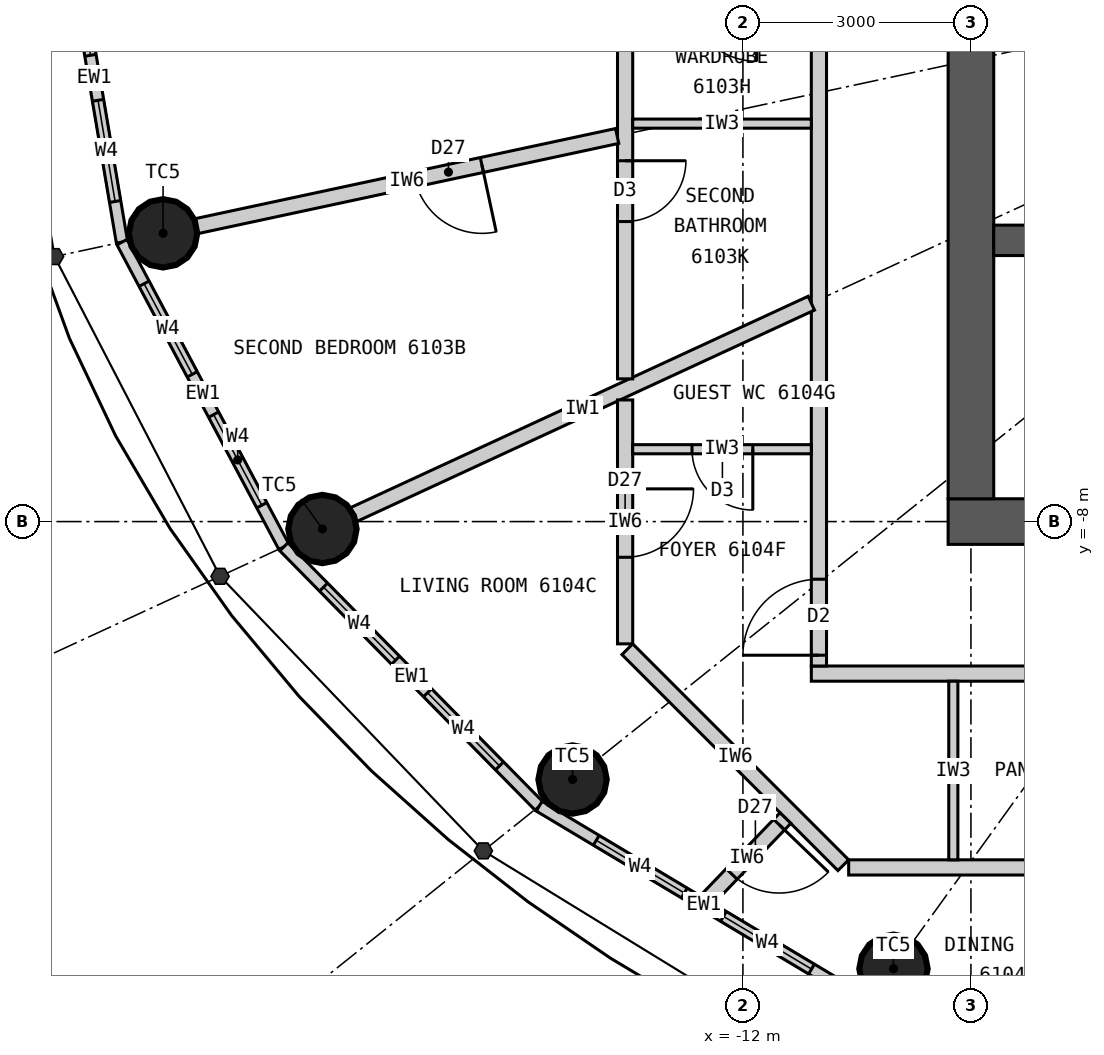
"""IFC4 building model, lengths in metres.
Left out: names, types, materials, properties, quantities, classifications, styles, units other than length and angle.
Written with IfcOpenShell. Run it as: python <this file> out.ifc"""

import sys

from ifc_helpers import new_model, si_unit, direction, frame, frame_2d, origin, origin_2d, place, context, subcontext, project, spatial, rectangle, circle, extrude, element, fill, save


model = new_model("IFC4")
c1 = context("Model", 3, precision=1e-05, world=origin(), true_north=direction((0.0, 1.0)))
c2 = subcontext(c1, "Body", "Model", "MODEL_VIEW")
j1 = project(units=[si_unit("LENGTHUNIT", "METRE"), si_unit("PLANEANGLEUNIT", "RADIAN")], contexts=[c1])
p1 = place(None, origin())
s1 = spatial("IfcSite", under=j1, at=p1, CompositionType="ELEMENT")
p2 = place(p1, origin())
s2 = spatial("IfcBuilding", under=s1, at=p2, CompositionType="ELEMENT")
p3 = place(p2, frame((0.0, 0.0, 225.9)))
s3 = spatial("IfcBuildingStorey", under=s2, at=p3, CompositionType="ELEMENT", Elevation=225.9)
for number, where, z_axis, x_axis in (
    (1, (-19.629, -4.208, 0.0), (0.0, 0.0, 1.0), (1.0, 0.0, 0.0)),
    (2, (-17.532, -8.098, 0.0), (0.0, 0.0, 1.0), (1.0, 0.0, 0.0)),
    (3, (-14.241, -11.393, 0.0), (0.0, 0.0, 1.0), (1.0, 0.0, 0.0)),
    (4, (-10.019, -13.883, 0.0), (0.0, 0.0, 1.0), (1.0, 0.0, 0.0)),
):
    element("IfcColumn", number, at=place(p3, frame(where, z_axis=z_axis, x_axis=x_axis)), inside=s3, PredefinedType="COLUMN", context=c2, shape_type="SweptSolid", body=[
        extrude(circle(Radius=0.45, at=origin_2d()), origin(), (0.0, 0.0, 1.0), 3.3),
    ])
p4 = place(p3, frame((9.3, -8.0, 0.0), z_axis=(0.0, 0.0, 1.0), x_axis=(-1.0, 0.0, 0.0)))
e5 = element("IfcWall", 5, at=p4, inside=s3, PredefinedType="SHEAR", context=c2, shape_type="SweptSolid", body=[
    extrude(rectangle(XDim=18.6, YDim=0.6, at=frame_2d((9.3, 0.0))), origin(), (0.0, 0.0, 1.0), 3.3),
])
p5 = place(p4, frame((8.0, 0.0, 0.0)))
e6 = element("IfcOpeningElement", 6, at=p5, cuts=e5, PredefinedType="OPENING", context=c2, shape_type="SweptSolid", body=[
    extrude(rectangle(XDim=1.2, YDim=2.2, at=frame_2d((0.6, 1.1))), frame((0.0, 0.31, 0.0), z_axis=(0.0, -1.0, 0.0), x_axis=(1.0, 0.0, 0.0)), (0.0, 0.0, 1.0), 0.62),
])
p6 = place(p4, frame((15.6, 0.0, 0.0)))
e7 = element("IfcOpeningElement", 7, at=p6, cuts=e5, PredefinedType="OPENING", context=c2, shape_type="SweptSolid", body=[
    extrude(rectangle(XDim=0.9, YDim=2.2, at=frame_2d((0.45, 1.1))), frame((0.0, 0.31, 0.0), z_axis=(0.0, -1.0, 0.0), x_axis=(1.0, 0.0, 0.0)), (0.0, 0.0, 1.0), 0.62),
])
p7 = place(p3, frame((-9.0, 7.7, 0.0), z_axis=(0.0, 0.0, 1.0), x_axis=(0.0, -1.0, 0.0)))
e8 = element("IfcWall", 8, at=p7, inside=s3, PredefinedType="SHEAR", context=c2, shape_type="SweptSolid", body=[
    extrude(rectangle(XDim=15.4, YDim=0.6, at=frame_2d((7.7, 0.0))), origin(), (0.0, 0.0, 1.0), 3.3),
])
p8 = place(p7, frame((6.8, 0.0, 0.0)))
e9 = element("IfcOpeningElement", 9, at=p8, cuts=e8, PredefinedType="OPENING", context=c2, shape_type="SweptSolid", body=[
    extrude(rectangle(XDim=1.8, YDim=2.2, at=frame_2d((0.9, 1.1))), frame((0.0, 0.31, 0.0), z_axis=(0.0, -1.0, 0.0), x_axis=(1.0, 0.0, 0.0)), (0.0, 0.0, 1.0), 0.62),
])
p9 = place(p3, frame((-8.7, -4.3, 0.0), z_axis=(0.0, 0.0, 1.0), x_axis=(1.0, 0.0, 0.0)))
e10 = element("IfcWall", 10, at=p9, inside=s3, PredefinedType="SHEAR", context=c2, shape_type="SweptSolid", body=[
    extrude(rectangle(XDim=17.4, YDim=0.4, at=frame_2d((8.7, 0.0))), origin(), (0.0, 0.0, 1.0), 3.3),
])
p10 = place(p3, frame((-20.9, 0.0, 0.0), z_axis=(0.0, 0.0, 1.0), x_axis=(0.166538513568, -0.986034950445, 0.0)))
e11 = element("IfcWall", 11, at=p10, inside=s3, PredefinedType="ELEMENTEDWALL", context=c2, shape_type="SweptSolid", body=[
    extrude(rectangle(XDim=4.385, YDim=0.15, at=frame_2d((2.192, 0.0))), origin(), (0.0, 0.0, 1.0), 3.12),
])
p11 = place(p10, frame((0.542, 0.0, 0.9)))
e12 = element("IfcOpeningElement", 12, at=p11, cuts=e11, PredefinedType="OPENING", context=c2, shape_type="SweptSolid", body=[
    extrude(rectangle(XDim=1.35, YDim=1.9, at=frame_2d((0.675, 0.95))), frame((0.0, 0.085, 0.0), z_axis=(0.0, -1.0, 0.0), x_axis=(1.0, 0.0, 0.0)), (0.0, 0.0, 1.0), 0.17),
])
p12 = place(p10, frame((2.492, 0.0, 0.9)))
e13 = element("IfcOpeningElement", 13, at=p12, cuts=e11, PredefinedType="OPENING", context=c2, shape_type="SweptSolid", body=[
    extrude(rectangle(XDim=1.35, YDim=1.9, at=frame_2d((0.675, 0.95))), frame((0.0, 0.085, 0.0), z_axis=(0.0, -1.0, 0.0), x_axis=(1.0, 0.0, 0.0)), (0.0, 0.0, 1.0), 0.17),
])
p13 = place(p3, frame((-20.17, -4.323, 0.0), z_axis=(0.0, 0.0, 1.0), x_axis=(0.469256152955, -0.883062094597, 0.0)))
e14 = element("IfcWall", 14, at=p13, inside=s3, PredefinedType="ELEMENTEDWALL", context=c2, shape_type="SweptSolid", body=[
    extrude(rectangle(XDim=4.539, YDim=0.15, at=frame_2d((2.27, 0.0))), origin(), (0.0, 0.0, 1.0), 3.12),
])
p14 = place(p13, frame((0.62, 0.0, 0.9)))
e15 = element("IfcOpeningElement", 15, at=p14, cuts=e14, PredefinedType="OPENING", context=c2, shape_type="SweptSolid", body=[
    extrude(rectangle(XDim=1.35, YDim=1.9, at=frame_2d((0.675, 0.95))), frame((0.0, 0.085, 0.0), z_axis=(0.0, -1.0, 0.0), x_axis=(1.0, 0.0, 0.0)), (0.0, 0.0, 1.0), 0.17),
])
p15 = place(p13, frame((2.57, 0.0, 0.9)))
e16 = element("IfcOpeningElement", 16, at=p15, cuts=e14, PredefinedType="OPENING", context=c2, shape_type="SweptSolid", body=[
    extrude(rectangle(XDim=1.35, YDim=1.9, at=frame_2d((0.675, 0.95))), frame((0.0, 0.085, 0.0), z_axis=(0.0, -1.0, 0.0), x_axis=(1.0, 0.0, 0.0)), (0.0, 0.0, 1.0), 0.17),
])
p16 = place(p3, frame((-18.04, -8.332, 0.0), z_axis=(0.0, 0.0, 1.0), x_axis=(0.701527379618, -0.712642501993, 0.0)))
e17 = element("IfcWall", 17, at=p16, inside=s3, PredefinedType="ELEMENTEDWALL", context=c2, shape_type="SweptSolid", body=[
    extrude(rectangle(XDim=4.788, YDim=0.15, at=frame_2d((2.394, 0.0))), origin(), (0.0, 0.0, 1.0), 3.12),
])
p17 = place(p16, frame((0.744, 0.0, 0.9)))
e18 = element("IfcOpeningElement", 18, at=p17, cuts=e17, PredefinedType="OPENING", context=c2, shape_type="SweptSolid", body=[
    extrude(rectangle(XDim=1.35, YDim=1.9, at=frame_2d((0.675, 0.95))), frame((0.0, 0.085, 0.0), z_axis=(0.0, -1.0, 0.0), x_axis=(1.0, 0.0, 0.0)), (0.0, 0.0, 1.0), 0.17),
])
p18 = place(p16, frame((2.694, 0.0, 0.9)))
e19 = element("IfcOpeningElement", 19, at=p18, cuts=e17, PredefinedType="OPENING", context=c2, shape_type="SweptSolid", body=[
    extrude(rectangle(XDim=1.35, YDim=1.9, at=frame_2d((0.675, 0.95))), frame((0.0, 0.085, 0.0), z_axis=(0.0, -1.0, 0.0), x_axis=(1.0, 0.0, 0.0)), (0.0, 0.0, 1.0), 0.17),
])
p19 = place(p3, frame((-14.68, -11.744, 0.0), z_axis=(0.0, 0.0, 1.0), x_axis=(0.85822150553, -0.513279502265, 0.0)))
e20 = element("IfcWall", 20, at=p19, inside=s3, PredefinedType="ELEMENTEDWALL", context=c2, shape_type="SweptSolid", body=[
    extrude(rectangle(XDim=5.05, YDim=0.15, at=frame_2d((2.525, 0.0))), origin(), (0.0, 0.0, 1.0), 3.12),
])
p20 = place(p19, frame((0.875, 0.0, 0.9)))
e21 = element("IfcOpeningElement", 21, at=p20, cuts=e20, PredefinedType="OPENING", context=c2, shape_type="SweptSolid", body=[
    extrude(rectangle(XDim=1.35, YDim=1.9, at=frame_2d((0.675, 0.95))), frame((0.0, 0.085, 0.0), z_axis=(0.0, -1.0, 0.0), x_axis=(1.0, 0.0, 0.0)), (0.0, 0.0, 1.0), 0.17),
])
p21 = place(p19, frame((2.825, 0.0, 0.9)))
e22 = element("IfcOpeningElement", 22, at=p21, cuts=e20, PredefinedType="OPENING", context=c2, shape_type="SweptSolid", body=[
    extrude(rectangle(XDim=1.35, YDim=1.9, at=frame_2d((0.675, 0.95))), frame((0.0, 0.085, 0.0), z_axis=(0.0, -1.0, 0.0), x_axis=(1.0, 0.0, 0.0)), (0.0, 0.0, 1.0), 0.17),
])
p22 = place(p3, frame((11.1, -10.0, 0.0), z_axis=(0.0, 0.0, 1.0), x_axis=(-1.0, 0.0, 0.0)))
e23 = element("IfcWall", 23, at=p22, inside=s3, PredefinedType="PARTITIONING", context=c2, shape_type="SweptSolid", body=[
    extrude(rectangle(XDim=22.2, YDim=0.2, at=frame_2d((11.1, 0.0))), origin(), (0.0, 0.0, 1.0), 3.12),
])
p23 = place(p22, frame((0.3, 0.0, 0.0)))
e24 = element("IfcOpeningElement", 24, at=p23, cuts=e23, PredefinedType="OPENING", context=c2, shape_type="SweptSolid", body=[
    extrude(rectangle(XDim=1.0, YDim=2.2, at=frame_2d((0.5, 1.1))), frame((0.0, 0.11, 0.0), z_axis=(0.0, -1.0, 0.0), x_axis=(1.0, 0.0, 0.0)), (0.0, 0.0, 1.0), 0.22),
])
p24 = place(p3, frame((-11.0, 9.9, 0.0), z_axis=(0.0, 0.0, 1.0), x_axis=(0.0, -1.0, 0.0)))
e25 = element("IfcWall", 25, at=p24, inside=s3, PredefinedType="PARTITIONING", context=c2, shape_type="SweptSolid", body=[
    extrude(rectangle(XDim=19.8, YDim=0.2, at=frame_2d((9.9, 0.0))), origin(), (0.0, 0.0, 1.0), 3.12),
])
p25 = place(p24, frame((9.385, 0.0, 0.0)))
e26 = element("IfcOpeningElement", 26, at=p25, cuts=e25, PredefinedType="OPENING", context=c2, shape_type="SweptSolid", body=[
    extrude(rectangle(XDim=1.0, YDim=2.2, at=frame_2d((0.5, 1.1))), frame((0.0, 0.11, 0.0), z_axis=(0.0, -1.0, 0.0), x_axis=(1.0, 0.0, 0.0)), (0.0, 0.0, 1.0), 0.22),
])
p26 = place(p24, frame((18.658, 0.0, 0.0)))
e27 = element("IfcOpeningElement", 27, at=p26, cuts=e25, PredefinedType="OPENING", context=c2, shape_type="SweptSolid", body=[
    extrude(rectangle(XDim=1.0, YDim=2.2, at=frame_2d((0.5, 1.1))), frame((0.0, 0.11, 0.0), z_axis=(0.0, -1.0, 0.0), x_axis=(1.0, 0.0, 0.0)), (0.0, 0.0, 1.0), 0.22),
])
p27 = place(p3, frame((-11.1, -5.127, 0.0), z_axis=(0.0, 0.0, 1.0), x_axis=(-0.907840886552, -0.419314827672, 0.0)))
e28 = element("IfcWall", 28, at=p27, inside=s3, PredefinedType="PARTITIONING", context=c2, shape_type="SweptSolid", body=[
    extrude(rectangle(XDim=6.635, YDim=0.2, at=frame_2d((3.318, 0.0))), origin(), (0.0, 0.0, 1.0), 2.32),
])
p28 = place(p3, frame((-13.55, 6.117, 0.0), z_axis=(0.0, 0.0, 1.0), x_axis=(0.0, -1.0, 0.0)))
e29 = element("IfcWall", 29, at=p28, inside=s3, PredefinedType="PARTITIONING", context=c2, shape_type="SweptSolid", body=[
    extrude(rectangle(XDim=12.24, YDim=0.2, at=frame_2d((6.12, 0.0))), origin(), (0.0, 0.0, 1.0), 3.12),
])
p29 = place(p28, frame((2.07, 0.0, 0.0)))
e30 = element("IfcOpeningElement", 30, at=p29, cuts=e29, PredefinedType="OPENING", context=c2, shape_type="SweptSolid", body=[
    extrude(rectangle(XDim=0.8, YDim=2.1, at=frame_2d((0.4, 1.05))), frame((0.0, 0.11, 0.0), z_axis=(0.0, -1.0, 0.0), x_axis=(1.0, 0.0, 0.0)), (0.0, 0.0, 1.0), 0.22),
])
p30 = place(p28, frame((9.37, 0.0, 0.0)))
e31 = element("IfcOpeningElement", 31, at=p30, cuts=e29, PredefinedType="OPENING", context=c2, shape_type="SweptSolid", body=[
    extrude(rectangle(XDim=0.8, YDim=2.1, at=frame_2d((0.4, 1.05))), frame((0.0, 0.11, 0.0), z_axis=(0.0, -1.0, 0.0), x_axis=(1.0, 0.0, 0.0)), (0.0, 0.0, 1.0), 0.22),
])
p31 = place(p28, frame((5.67, 0.0, 0.0)))
e32 = element("IfcOpeningElement", 32, at=p31, cuts=e29, PredefinedType="OPENING", context=c2, shape_type="SweptSolid", body=[
    extrude(rectangle(XDim=0.9, YDim=2.1, at=frame_2d((0.45, 1.05))), frame((0.0, 0.11, 0.0), z_axis=(0.0, -1.0, 0.0), x_axis=(1.0, 0.0, 0.0)), (0.0, 0.0, 1.0), 0.22),
])
p32 = place(p3, frame((-13.655, -2.927, 0.0), z_axis=(0.0, 0.0, 1.0), x_axis=(-0.977790419294, -0.209585056568, 0.0)))
e33 = element("IfcWall", 33, at=p32, inside=s3, PredefinedType="PARTITIONING", context=c2, shape_type="SweptSolid", body=[
    extrude(rectangle(XDim=5.66, YDim=0.2, at=frame_2d((2.83, 0.0))), origin(), (0.0, 0.0, 1.0), 2.42),
])
p33 = place(p32, frame((1.82, 0.0, 0.0)))
e34 = element("IfcOpeningElement", 34, at=p33, cuts=e33, PredefinedType="OPENING", context=c2, shape_type="SweptSolid", body=[
    extrude(rectangle(XDim=0.9, YDim=2.1, at=frame_2d((0.45, 1.05))), frame((0.0, 0.11, 0.0), z_axis=(0.0, -1.0, 0.0), x_axis=(1.0, 0.0, 0.0)), (0.0, 0.0, 1.0), 0.22),
])
p34 = place(p3, frame((-11.1, -2.764, 0.0), z_axis=(0.0, 0.0, 1.0), x_axis=(-1.0, 0.0, 0.0)))
e35 = element("IfcWall", 35, at=p34, inside=s3, PredefinedType="PARTITIONING", context=c2, shape_type="SweptSolid", body=[
    extrude(rectangle(XDim=2.35, YDim=0.12, at=frame_2d((1.175, 0.0))), origin(), (0.0, 0.0, 1.0), 2.42),
])
p35 = place(p3, frame((-13.55, -6.4, 0.0), z_axis=(0.0, 0.0, 1.0), x_axis=(0.0, -1.0, 0.0)))
e36 = element("IfcWall", 36, at=p35, inside=s3, PredefinedType="PARTITIONING", context=c2, shape_type="SweptSolid", body=[
    extrude(rectangle(XDim=3.209, YDim=0.2, at=frame_2d((1.604, 0.0))), origin(), (0.0, 0.0, 1.0), 3.12),
])
p36 = place(p35, frame((1.17, 0.0, 0.0)))
e37 = element("IfcOpeningElement", 37, at=p36, cuts=e36, PredefinedType="OPENING", context=c2, shape_type="SweptSolid", body=[
    extrude(rectangle(XDim=0.9, YDim=2.1, at=frame_2d((0.45, 1.05))), frame((0.0, 0.11, 0.0), z_axis=(0.0, -1.0, 0.0), x_axis=(1.0, 0.0, 0.0)), (0.0, 0.0, 1.0), 0.22),
])
p37 = place(p3, frame((-13.521, -9.679, 0.0), z_axis=(0.0, 0.0, 1.0), x_axis=(0.707106781187, -0.707106781187, 0.0)))
e38 = element("IfcWall", 38, at=p37, inside=s3, PredefinedType="PARTITIONING", context=c2, shape_type="SweptSolid", body=[
    extrude(rectangle(XDim=4.019, YDim=0.2, at=frame_2d((2.009, 0.0))), origin(), (0.0, 0.0, 1.0), 3.12),
])
p38 = place(p3, frame((-10.609, -12.55, 0.0), z_axis=(0.0, 0.0, 1.0), x_axis=(1.0, 0.0, 0.0)))
e39 = element("IfcWall", 39, at=p38, inside=s3, PredefinedType="PARTITIONING", context=c2, shape_type="SweptSolid", body=[
    extrude(rectangle(XDim=10.508, YDim=0.2, at=frame_2d((5.254, 0.0))), origin(), (0.0, 0.0, 1.0), 3.12),
])
p39 = place(p38, frame((2.57, 0.0, 0.0)))
e40 = element("IfcOpeningElement", 40, at=p39, cuts=e39, PredefinedType="OPENING", context=c2, shape_type="SweptSolid", body=[
    extrude(rectangle(XDim=0.9, YDim=2.1, at=frame_2d((0.45, 1.05))), frame((0.0, 0.11, 0.0), z_axis=(0.0, -1.0, 0.0), x_axis=(1.0, 0.0, 0.0)), (0.0, 0.0, 1.0), 0.22),
])
p40 = place(p38, frame((4.82, 0.0, 0.0)))
e41 = element("IfcOpeningElement", 41, at=p40, cuts=e39, PredefinedType="OPENING", context=c2, shape_type="SweptSolid", body=[
    extrude(rectangle(XDim=0.9, YDim=2.1, at=frame_2d((0.45, 1.05))), frame((0.0, 0.11, 0.0), z_axis=(0.0, -1.0, 0.0), x_axis=(1.0, 0.0, 0.0)), (0.0, 0.0, 1.0), 0.22),
])
p41 = place(p38, frame((7.303, 0.0, 0.0)))
e42 = element("IfcOpeningElement", 42, at=p41, cuts=e39, PredefinedType="OPENING", context=c2, shape_type="SweptSolid", body=[
    extrude(rectangle(XDim=0.8, YDim=2.1, at=frame_2d((0.4, 1.05))), frame((0.0, 0.11, 0.0), z_axis=(0.0, -1.0, 0.0), x_axis=(1.0, 0.0, 0.0)), (0.0, 0.0, 1.0), 0.22),
])
p42 = place(p3, frame((-11.441, -11.9, 0.0), z_axis=(0.0, 0.0, 1.0), x_axis=(-0.692958717259, -0.720977264672, 0.0)))
e43 = element("IfcWall", 43, at=p42, inside=s3, PredefinedType="PARTITIONING", context=c2, shape_type="SweptSolid", body=[
    extrude(rectangle(XDim=1.464, YDim=0.2, at=frame_2d((0.732, 0.0))), origin(), (0.0, 0.0, 1.0), 3.12),
])
p43 = place(p42, frame((0.12, 0.0, 0.0)))
e44 = element("IfcOpeningElement", 44, at=p43, cuts=e43, PredefinedType="OPENING", context=c2, shape_type="SweptSolid", body=[
    extrude(rectangle(XDim=0.9, YDim=2.1, at=frame_2d((0.45, 1.05))), frame((0.0, 0.11, 0.0), z_axis=(0.0, -1.0, 0.0), x_axis=(1.0, 0.0, 0.0)), (0.0, 0.0, 1.0), 0.22),
])
p44 = place(p3, frame((-11.1, -7.048, 0.0), z_axis=(0.0, 0.0, 1.0), x_axis=(-1.0, 0.0, 0.0)))
e45 = element("IfcWall", 45, at=p44, inside=s3, PredefinedType="PARTITIONING", context=c2, shape_type="SweptSolid", body=[
    extrude(rectangle(XDim=2.35, YDim=0.12, at=frame_2d((1.175, 0.0))), origin(), (0.0, 0.0, 1.0), 3.12),
])
p45 = place(p44, frame((0.77, 0.0, 0.0)))
e46 = element("IfcOpeningElement", 46, at=p45, cuts=e45, PredefinedType="OPENING", context=c2, shape_type="SweptSolid", body=[
    extrude(rectangle(XDim=0.8, YDim=2.1, at=frame_2d((0.4, 1.05))), frame((0.0, 0.07, 0.0), z_axis=(0.0, -1.0, 0.0), x_axis=(1.0, 0.0, 0.0)), (0.0, 0.0, 1.0), 0.14),
])
p46 = place(p3, frame((-9.232, -10.1, 0.0), z_axis=(0.0, 0.0, 1.0), x_axis=(0.0, -1.0, 0.0)))
e47 = element("IfcWall", 47, at=p46, inside=s3, PredefinedType="PARTITIONING", context=c2, shape_type="SweptSolid", body=[
    extrude(rectangle(XDim=2.35, YDim=0.12, at=frame_2d((1.175, 0.0))), origin(), (0.0, 0.0, 1.0), 3.12),
])
p47 = place(p11, origin())
e48 = element("IfcWindow", 48, at=p47, inside=s3, PartitioningType="SINGLE_PANEL", PredefinedType="WINDOW", context=c2, shape_type="SweptSolid", body=[
    extrude(rectangle(XDim=1.35, YDim=1.9, at=frame_2d((0.675, 0.95))), frame((0.0, 0.03, 0.0), z_axis=(0.0, -1.0, 0.0), x_axis=(1.0, 0.0, 0.0)), (0.0, 0.0, 1.0), 0.06),
])
fill(e12, e48)
p48 = place(p12, origin())
e49 = element("IfcWindow", 49, at=p48, inside=s3, PartitioningType="SINGLE_PANEL", PredefinedType="WINDOW", context=c2, shape_type="SweptSolid", body=[
    extrude(rectangle(XDim=1.35, YDim=1.9, at=frame_2d((0.675, 0.95))), frame((0.0, 0.03, 0.0), z_axis=(0.0, -1.0, 0.0), x_axis=(1.0, 0.0, 0.0)), (0.0, 0.0, 1.0), 0.06),
])
fill(e13, e49)
p49 = place(p14, origin())
e50 = element("IfcWindow", 50, at=p49, inside=s3, PartitioningType="SINGLE_PANEL", PredefinedType="WINDOW", context=c2, shape_type="SweptSolid", body=[
    extrude(rectangle(XDim=1.35, YDim=1.9, at=frame_2d((0.675, 0.95))), frame((0.0, 0.03, 0.0), z_axis=(0.0, -1.0, 0.0), x_axis=(1.0, 0.0, 0.0)), (0.0, 0.0, 1.0), 0.06),
])
fill(e15, e50)
p50 = place(p15, origin())
e51 = element("IfcWindow", 51, at=p50, inside=s3, PartitioningType="SINGLE_PANEL", PredefinedType="WINDOW", context=c2, shape_type="SweptSolid", body=[
    extrude(rectangle(XDim=1.35, YDim=1.9, at=frame_2d((0.675, 0.95))), frame((0.0, 0.03, 0.0), z_axis=(0.0, -1.0, 0.0), x_axis=(1.0, 0.0, 0.0)), (0.0, 0.0, 1.0), 0.06),
])
fill(e16, e51)
p51 = place(p17, origin())
e52 = element("IfcWindow", 52, at=p51, inside=s3, PartitioningType="SINGLE_PANEL", PredefinedType="WINDOW", context=c2, shape_type="SweptSolid", body=[
    extrude(rectangle(XDim=1.35, YDim=1.9, at=frame_2d((0.675, 0.95))), frame((0.0, 0.03, 0.0), z_axis=(0.0, -1.0, 0.0), x_axis=(1.0, 0.0, 0.0)), (0.0, 0.0, 1.0), 0.06),
])
fill(e18, e52)
p52 = place(p18, origin())
e53 = element("IfcWindow", 53, at=p52, inside=s3, PartitioningType="SINGLE_PANEL", PredefinedType="WINDOW", context=c2, shape_type="SweptSolid", body=[
    extrude(rectangle(XDim=1.35, YDim=1.9, at=frame_2d((0.675, 0.95))), frame((0.0, 0.03, 0.0), z_axis=(0.0, -1.0, 0.0), x_axis=(1.0, 0.0, 0.0)), (0.0, 0.0, 1.0), 0.06),
])
fill(e19, e53)
p53 = place(p20, origin())
e54 = element("IfcWindow", 54, at=p53, inside=s3, PartitioningType="SINGLE_PANEL", PredefinedType="WINDOW", context=c2, shape_type="SweptSolid", body=[
    extrude(rectangle(XDim=1.35, YDim=1.9, at=frame_2d((0.675, 0.95))), frame((0.0, 0.03, 0.0), z_axis=(0.0, -1.0, 0.0), x_axis=(1.0, 0.0, 0.0)), (0.0, 0.0, 1.0), 0.06),
])
fill(e21, e54)
p54 = place(p21, origin())
e55 = element("IfcWindow", 55, at=p54, inside=s3, PartitioningType="SINGLE_PANEL", PredefinedType="WINDOW", context=c2, shape_type="SweptSolid", body=[
    extrude(rectangle(XDim=1.35, YDim=1.9, at=frame_2d((0.675, 0.95))), frame((0.0, 0.03, 0.0), z_axis=(0.0, -1.0, 0.0), x_axis=(1.0, 0.0, 0.0)), (0.0, 0.0, 1.0), 0.06),
])
fill(e22, e55)
p55 = place(p30, origin())
e56 = element("IfcDoor", 56, at=p55, inside=s3, OperationType="SINGLE_SWING_LEFT", PredefinedType="DOOR", context=c2, shape_type="SweptSolid", body=[
    extrude(rectangle(XDim=0.8, YDim=2.1, at=frame_2d((0.4, 1.05))), frame((0.0, 0.025, 0.0), z_axis=(0.0, -1.0, 0.0), x_axis=(1.0, 0.0, 0.0)), (0.0, 0.0, 1.0), 0.05),
])
fill(e31, e56)
p56 = place(p33, origin())
e57 = element("IfcDoor", 57, at=p56, inside=s3, OperationType="SINGLE_SWING_LEFT", PredefinedType="DOOR", context=c2, shape_type="SweptSolid", body=[
    extrude(rectangle(XDim=0.9, YDim=2.1, at=frame_2d((0.45, 1.05))), frame((0.0, 0.025, 0.0), z_axis=(0.0, -1.0, 0.0), x_axis=(1.0, 0.0, 0.0)), (0.0, 0.0, 1.0), 0.05),
])
fill(e34, e57)
p57 = place(p26, origin())
e58 = element("IfcDoor", 58, at=p57, inside=s3, OperationType="SINGLE_SWING_RIGHT", PredefinedType="DOOR", context=c2, shape_type="SweptSolid", body=[
    extrude(rectangle(XDim=1.0, YDim=2.2, at=frame_2d((0.5, 1.1))), frame((0.0, 0.025, 0.0), z_axis=(0.0, -1.0, 0.0), x_axis=(1.0, 0.0, 0.0)), (0.0, 0.0, 1.0), 0.05),
])
fill(e27, e58)
p58 = place(p45, origin())
e59 = element("IfcDoor", 59, at=p58, inside=s3, OperationType="SINGLE_SWING_LEFT", PredefinedType="DOOR", context=c2, shape_type="SweptSolid", body=[
    extrude(rectangle(XDim=0.8, YDim=2.1, at=frame_2d((0.4, 1.05))), frame((0.0, 0.025, 0.0), z_axis=(0.0, -1.0, 0.0), x_axis=(1.0, 0.0, 0.0)), (0.0, 0.0, 1.0), 0.05),
])
fill(e46, e59)
p59 = place(p36, origin())
e60 = element("IfcDoor", 60, at=p59, inside=s3, OperationType="SINGLE_SWING_LEFT", PredefinedType="DOOR", context=c2, shape_type="SweptSolid", body=[
    extrude(rectangle(XDim=0.9, YDim=2.1, at=frame_2d((0.45, 1.05))), frame((0.0, 0.025, 0.0), z_axis=(0.0, -1.0, 0.0), x_axis=(1.0, 0.0, 0.0)), (0.0, 0.0, 1.0), 0.05),
])
fill(e37, e60)
p60 = place(p43, origin())
e61 = element("IfcDoor", 61, at=p60, inside=s3, OperationType="SINGLE_SWING_LEFT", PredefinedType="DOOR", context=c2, shape_type="SweptSolid", body=[
    extrude(rectangle(XDim=0.9, YDim=2.1, at=frame_2d((0.45, 1.05))), frame((0.0, 0.025, 0.0), z_axis=(0.0, -1.0, 0.0), x_axis=(1.0, 0.0, 0.0)), (0.0, 0.0, 1.0), 0.05),
])
fill(e44, e61)
save(model, sys.argv[1])
